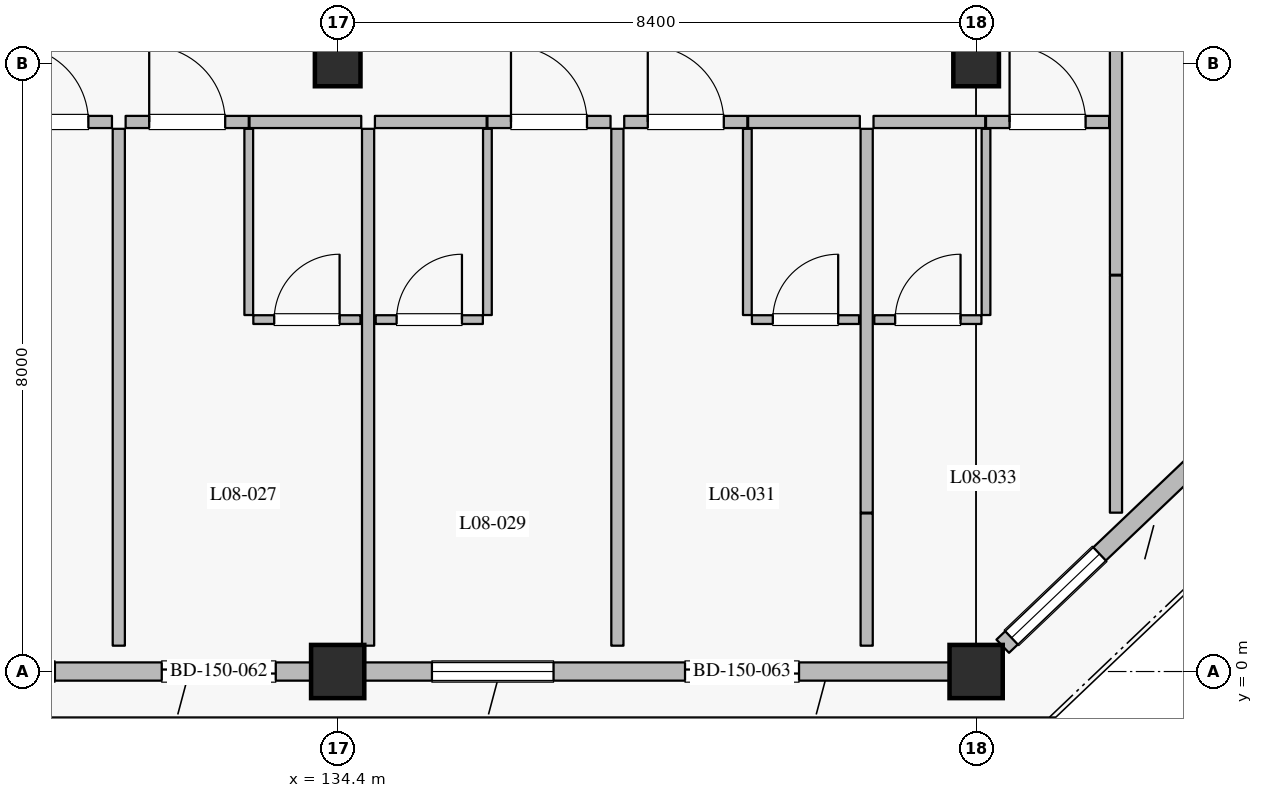
"""IFC4 building model, lengths in metres.
Left out: names, types, materials, properties, quantities, classifications, styles, units other than length and angle.
Written with IfcOpenShell. Run it as: python <this file> out.ifc"""

import sys

from ifc_helpers import new_model, si_unit, direction, frame, frame_2d, origin, origin_2d, place, context, subcontext, project, spatial, rectangle, extrude, element, fill, save


model = new_model("IFC4")
c1 = context("Model", 3, precision=1e-05, world=origin(), true_north=direction((0.0, 1.0)))
c2 = subcontext(c1, "Body", "Model", "MODEL_VIEW")
j1 = project(units=[si_unit("LENGTHUNIT", "METRE"), si_unit("PLANEANGLEUNIT", "RADIAN")], contexts=[c1])
p1 = place(None, origin())
s1 = spatial("IfcSite", under=j1, at=p1, CompositionType="ELEMENT")
p2 = place(p1, origin())
s2 = spatial("IfcBuilding", under=s1, at=p2, CompositionType="ELEMENT")
p3 = place(p2, frame((0.0, 0.0, 36.0)))
s3 = spatial("IfcBuildingStorey", under=s2, at=p3, CompositionType="ELEMENT", Elevation=36.0)
for number, where, z_axis, x_axis in (
    (1, (134.4, 0.0, 0.0), (0.0, 0.0, 1.0), (1.0, 0.0, 0.0)),
    (2, (142.8, 0.0, 0.0), (0.0, 0.0, 1.0), (1.0, 0.0, 0.0)),
):
    element("IfcColumn", number, at=place(p3, frame(where, z_axis=z_axis, x_axis=x_axis)), inside=s3, PredefinedType="COLUMN", context=c2, shape_type="SweptSolid", body=[
        extrude(rectangle(XDim=0.7, YDim=0.7, at=origin_2d()), origin(), (0.0, 0.0, 1.0), 3.6),
    ])
for number, where, z_axis, x_axis in (
    (3, (134.4, 8.0, 0.0), (0.0, 0.0, 1.0), (1.0, 0.0, 0.0)),
    (4, (142.8, 8.0, 0.0), (0.0, 0.0, 1.0), (1.0, 0.0, 0.0)),
):
    element("IfcColumn", number, at=place(p3, frame(where, z_axis=z_axis, x_axis=x_axis)), inside=s3, PredefinedType="COLUMN", context=c2, shape_type="SweptSolid", body=[
        extrude(rectangle(XDim=0.6, YDim=0.6, at=origin_2d()), origin(), (0.0, 0.0, 1.0), 3.6),
    ])
p4 = place(p3, frame((134.05, 0.0, 0.0), z_axis=(0.0, 0.0, 1.0), x_axis=(-1.0, 0.0, 0.0)))
e5 = element("IfcWall", 5, at=p4, inside=s3, PredefinedType="SOLIDWALL", context=c2, shape_type="SweptSolid", body=[
    extrude(rectangle(XDim=7.7, YDim=0.24, at=frame_2d((3.85, 0.0))), origin(), (0.0, 0.0, 1.0), 2.94),
])
p5 = place(p4, frame((0.465, 0.0, 0.0)))
e6 = element("IfcOpeningElement", 6, at=p5, cuts=e5, PredefinedType="OPENING", context=c2, shape_type="SweptSolid", body=[
    extrude(rectangle(XDim=1.5, YDim=2.25, at=frame_2d((0.75, 1.125))), frame((0.0, 0.13, 0.0), z_axis=(0.0, -1.0, 0.0), x_axis=(1.0, 0.0, 0.0)), (0.0, 0.0, 1.0), 0.26),
])
p6 = place(p4, frame((3.37, 0.0, 0.8)))
e7 = element("IfcOpeningElement", 7, at=p6, cuts=e5, PredefinedType="OPENING", context=c2, shape_type="SweptSolid", body=[
    extrude(rectangle(XDim=1.6, YDim=1.6, at=frame_2d((0.8, 0.8))), frame((0.0, 0.13, 0.0), z_axis=(0.0, -1.0, 0.0), x_axis=(1.0, 0.0, 0.0)), (0.0, 0.0, 1.0), 0.26),
])
p7 = place(p4, frame((6.105, 0.0, 0.8)))
e8 = element("IfcOpeningElement", 8, at=p7, cuts=e5, PredefinedType="OPENING", context=c2, shape_type="SweptSolid", body=[
    extrude(rectangle(XDim=1.4, YDim=1.6, at=frame_2d((0.7, 0.8))), frame((0.0, 0.13, 0.0), z_axis=(0.0, -1.0, 0.0), x_axis=(1.0, 0.0, 0.0)), (0.0, 0.0, 1.0), 0.26),
])
p8 = place(p3, frame((142.45, 0.0, 0.0), z_axis=(0.0, 0.0, 1.0), x_axis=(-1.0, 0.0, 0.0)))
e9 = element("IfcWall", 9, at=p8, inside=s3, PredefinedType="SOLIDWALL", context=c2, shape_type="SweptSolid", body=[
    extrude(rectangle(XDim=7.7, YDim=0.24, at=frame_2d((3.85, 0.0))), origin(), (0.0, 0.0, 1.0), 2.94),
])
p9 = place(p8, frame((1.98, 0.0, 0.0)))
e10 = element("IfcOpeningElement", 10, at=p9, cuts=e9, PredefinedType="OPENING", context=c2, shape_type="SweptSolid", body=[
    extrude(rectangle(XDim=1.5, YDim=2.25, at=frame_2d((0.75, 1.125))), frame((0.0, 0.13, 0.0), z_axis=(0.0, -1.0, 0.0), x_axis=(1.0, 0.0, 0.0)), (0.0, 0.0, 1.0), 0.26),
])
p10 = place(p8, frame((5.21, 0.0, 0.8)))
e11 = element("IfcOpeningElement", 11, at=p10, cuts=e9, PredefinedType="OPENING", context=c2, shape_type="SweptSolid", body=[
    extrude(rectangle(XDim=1.6, YDim=1.6, at=frame_2d((0.8, 0.8))), frame((0.0, 0.13, 0.0), z_axis=(0.0, -1.0, 0.0), x_axis=(1.0, 0.0, 0.0)), (0.0, 0.0, 1.0), 0.26),
])
p11 = place(p3, frame((150.85, 7.667, 0.0), z_axis=(0.0, 0.0, 1.0), x_axis=(-0.724116091282, -0.689678103427, 0.0)))
e12 = element("IfcWall", 12, at=p11, inside=s3, PredefinedType="SOLIDWALL", context=c2, shape_type="SweptSolid", body=[
    extrude(rectangle(XDim=10.634, YDim=0.24, at=frame_2d((5.317, 0.0))), origin(), (0.0, 0.0, 1.0), 2.94),
])
p12 = place(p11, frame((1.204, 0.0, 0.0)))
e13 = element("IfcOpeningElement", 13, at=p12, cuts=e12, PredefinedType="OPENING", context=c2, shape_type="SweptSolid", body=[
    extrude(rectangle(XDim=1.5, YDim=2.25, at=frame_2d((0.75, 1.125))), frame((0.0, 0.13, 0.0), z_axis=(0.0, -1.0, 0.0), x_axis=(1.0, 0.0, 0.0)), (0.0, 0.0, 1.0), 0.26),
])
p13 = place(p11, frame((5.511, 0.0, 0.8)))
e14 = element("IfcOpeningElement", 14, at=p13, cuts=e12, PredefinedType="OPENING", context=c2, shape_type="SweptSolid", body=[
    extrude(rectangle(XDim=1.6, YDim=1.6, at=frame_2d((0.8, 0.8))), frame((0.0, 0.13, 0.0), z_axis=(0.0, -1.0, 0.0), x_axis=(1.0, 0.0, 0.0)), (0.0, 0.0, 1.0), 0.26),
])
p14 = place(p11, frame((8.874, 0.0, 0.8)))
e15 = element("IfcOpeningElement", 15, at=p14, cuts=e12, PredefinedType="OPENING", context=c2, shape_type="SweptSolid", body=[
    extrude(rectangle(XDim=1.6, YDim=1.6, at=frame_2d((0.8, 0.8))), frame((0.0, 0.13, 0.0), z_axis=(0.0, -1.0, 0.0), x_axis=(1.0, 0.0, 0.0)), (0.0, 0.0, 1.0), 0.26),
])
p15 = place(p3, frame((129.81, 7.23, 0.0), z_axis=(0.0, 0.0, 1.0), x_axis=(1.0, 0.0, 0.0)))
e16 = element("IfcWall", 16, at=p15, inside=s3, PredefinedType="PARTITIONING", context=c2, shape_type="SweptSolid", body=[
    extrude(rectangle(XDim=1.62, YDim=0.16, at=frame_2d((0.81, 0.0))), origin(), (0.0, 0.0, 1.0), 3.365),
])
p16 = place(p15, frame((0.31, 0.0, 0.0)))
e17 = element("IfcOpeningElement", 17, at=p16, cuts=e16, PredefinedType="OPENING", context=c2, shape_type="SweptSolid", body=[
    extrude(rectangle(XDim=1.0, YDim=2.25, at=frame_2d((0.5, 1.125))), frame((0.0, 0.09, 0.0), z_axis=(0.0, -1.0, 0.0), x_axis=(1.0, 0.0, 0.0)), (0.0, 0.0, 1.0), 0.18),
])
p17 = place(p3, frame((131.61, 7.23, 0.0), z_axis=(0.0, 0.0, 1.0), x_axis=(1.0, 0.0, 0.0)))
e18 = element("IfcWall", 18, at=p17, inside=s3, PredefinedType="PARTITIONING", context=c2, shape_type="SweptSolid", body=[
    extrude(rectangle(XDim=1.62, YDim=0.16, at=frame_2d((0.81, 0.0))), origin(), (0.0, 0.0, 1.0), 3.365),
])
p18 = place(p17, frame((0.31, 0.0, 0.0)))
e19 = element("IfcOpeningElement", 19, at=p18, cuts=e18, PredefinedType="OPENING", context=c2, shape_type="SweptSolid", body=[
    extrude(rectangle(XDim=1.0, YDim=2.25, at=frame_2d((0.5, 1.125))), frame((0.0, 0.09, 0.0), z_axis=(0.0, -1.0, 0.0), x_axis=(1.0, 0.0, 0.0)), (0.0, 0.0, 1.0), 0.18),
])
p19 = place(p3, frame((133.24, 7.23, 0.0), z_axis=(0.0, 0.0, 1.0), x_axis=(1.0, 0.0, 0.0)))
e20 = element("IfcWall", 20, at=p19, inside=s3, PredefinedType="PARTITIONING", context=c2, shape_type="SweptSolid", body=[
    extrude(rectangle(XDim=1.47, YDim=0.16, at=frame_2d((0.735, 0.0))), origin(), (0.0, 0.0, 1.0), 3.365),
])
p20 = place(p3, frame((133.23, 4.69, 0.0), z_axis=(0.0, 0.0, 1.0), x_axis=(0.0, 1.0, 0.0)))
e21 = element("IfcWall", 21, at=p20, inside=s3, PredefinedType="PARTITIONING", context=c2, shape_type="SweptSolid", body=[
    extrude(rectangle(XDim=2.45, YDim=0.115, at=frame_2d((1.225, 0.0))), origin(), (0.0, 0.0, 1.0), 3.365),
])
p21 = place(p3, frame((133.29, 4.63, 0.0), z_axis=(0.0, 0.0, 1.0), x_axis=(1.0, 0.0, 0.0)))
e22 = element("IfcWall", 22, at=p21, inside=s3, PredefinedType="PARTITIONING", context=c2, shape_type="SweptSolid", body=[
    extrude(rectangle(XDim=1.41, YDim=0.115, at=frame_2d((0.705, 0.0))), origin(), (0.0, 0.0, 1.0), 3.365),
])
p22 = place(p21, frame((0.275, 0.0, 0.0)))
e23 = element("IfcOpeningElement", 23, at=p22, cuts=e22, PredefinedType="OPENING", context=c2, shape_type="SweptSolid", body=[
    extrude(rectangle(XDim=0.86, YDim=2.12, at=frame_2d((0.43, 1.06))), frame((0.0, 0.067, 0.0), z_axis=(0.0, -1.0, 0.0), x_axis=(1.0, 0.0, 0.0)), (0.0, 0.0, 1.0), 0.135),
])
p23 = place(p3, frame((131.52, 0.34, 0.0), z_axis=(0.0, 0.0, 1.0), x_axis=(0.0, 1.0, 0.0)))
e24 = element("IfcWall", 24, at=p23, inside=s3, PredefinedType="PARTITIONING", context=c2, shape_type="SweptSolid", body=[
    extrude(rectangle(XDim=6.8, YDim=0.16, at=frame_2d((3.4, 0.0))), origin(), (0.0, 0.0, 1.0), 3.365),
])
p24 = place(p3, frame((134.89, 7.23, 0.0), z_axis=(0.0, 0.0, 1.0), x_axis=(1.0, 0.0, 0.0)))
e25 = element("IfcWall", 25, at=p24, inside=s3, PredefinedType="PARTITIONING", context=c2, shape_type="SweptSolid", body=[
    extrude(rectangle(XDim=1.47, YDim=0.16, at=frame_2d((0.735, 0.0))), origin(), (0.0, 0.0, 1.0), 3.365),
])
p25 = place(p3, frame((136.37, 7.23, 0.0), z_axis=(0.0, 0.0, 1.0), x_axis=(1.0, 0.0, 0.0)))
e26 = element("IfcWall", 26, at=p25, inside=s3, PredefinedType="PARTITIONING", context=c2, shape_type="SweptSolid", body=[
    extrude(rectangle(XDim=1.62, YDim=0.16, at=frame_2d((0.81, 0.0))), origin(), (0.0, 0.0, 1.0), 3.365),
])
p26 = place(p25, frame((0.31, 0.0, 0.0)))
e27 = element("IfcOpeningElement", 27, at=p26, cuts=e26, PredefinedType="OPENING", context=c2, shape_type="SweptSolid", body=[
    extrude(rectangle(XDim=1.0, YDim=2.25, at=frame_2d((0.5, 1.125))), frame((0.0, 0.09, 0.0), z_axis=(0.0, -1.0, 0.0), x_axis=(1.0, 0.0, 0.0)), (0.0, 0.0, 1.0), 0.18),
])
p27 = place(p3, frame((136.37, 4.69, 0.0), z_axis=(0.0, 0.0, 1.0), x_axis=(0.0, 1.0, 0.0)))
e28 = element("IfcWall", 28, at=p27, inside=s3, PredefinedType="PARTITIONING", context=c2, shape_type="SweptSolid", body=[
    extrude(rectangle(XDim=2.45, YDim=0.115, at=frame_2d((1.225, 0.0))), origin(), (0.0, 0.0, 1.0), 3.365),
])
p28 = place(p3, frame((134.9, 4.63, 0.0), z_axis=(0.0, 0.0, 1.0), x_axis=(1.0, 0.0, 0.0)))
e29 = element("IfcWall", 29, at=p28, inside=s3, PredefinedType="PARTITIONING", context=c2, shape_type="SweptSolid", body=[
    extrude(rectangle(XDim=1.41, YDim=0.115, at=frame_2d((0.705, 0.0))), origin(), (0.0, 0.0, 1.0), 3.365),
])
p29 = place(p28, frame((0.275, 0.0, 0.0)))
e30 = element("IfcOpeningElement", 30, at=p29, cuts=e29, PredefinedType="OPENING", context=c2, shape_type="SweptSolid", body=[
    extrude(rectangle(XDim=0.86, YDim=2.12, at=frame_2d((0.43, 1.06))), frame((0.0, 0.067, 0.0), z_axis=(0.0, -1.0, 0.0), x_axis=(1.0, 0.0, 0.0)), (0.0, 0.0, 1.0), 0.135),
])
p30 = place(p3, frame((134.8, 0.34, 0.0), z_axis=(0.0, 0.0, 1.0), x_axis=(0.0, 1.0, 0.0)))
e31 = element("IfcWall", 31, at=p30, inside=s3, PredefinedType="PARTITIONING", context=c2, shape_type="SweptSolid", body=[
    extrude(rectangle(XDim=6.8, YDim=0.16, at=frame_2d((3.4, 0.0))), origin(), (0.0, 0.0, 1.0), 3.365),
])
p31 = place(p3, frame((138.17, 7.23, 0.0), z_axis=(0.0, 0.0, 1.0), x_axis=(1.0, 0.0, 0.0)))
e32 = element("IfcWall", 32, at=p31, inside=s3, PredefinedType="PARTITIONING", context=c2, shape_type="SweptSolid", body=[
    extrude(rectangle(XDim=1.62, YDim=0.16, at=frame_2d((0.81, 0.0))), origin(), (0.0, 0.0, 1.0), 3.365),
])
p32 = place(p31, frame((0.31, 0.0, 0.0)))
e33 = element("IfcOpeningElement", 33, at=p32, cuts=e32, PredefinedType="OPENING", context=c2, shape_type="SweptSolid", body=[
    extrude(rectangle(XDim=1.0, YDim=2.25, at=frame_2d((0.5, 1.125))), frame((0.0, 0.09, 0.0), z_axis=(0.0, -1.0, 0.0), x_axis=(1.0, 0.0, 0.0)), (0.0, 0.0, 1.0), 0.18),
])
p33 = place(p3, frame((139.8, 7.23, 0.0), z_axis=(0.0, 0.0, 1.0), x_axis=(1.0, 0.0, 0.0)))
e34 = element("IfcWall", 34, at=p33, inside=s3, PredefinedType="PARTITIONING", context=c2, shape_type="SweptSolid", body=[
    extrude(rectangle(XDim=1.47, YDim=0.16, at=frame_2d((0.735, 0.0))), origin(), (0.0, 0.0, 1.0), 3.365),
])
p34 = place(p3, frame((139.79, 4.69, 0.0), z_axis=(0.0, 0.0, 1.0), x_axis=(0.0, 1.0, 0.0)))
e35 = element("IfcWall", 35, at=p34, inside=s3, PredefinedType="PARTITIONING", context=c2, shape_type="SweptSolid", body=[
    extrude(rectangle(XDim=2.45, YDim=0.115, at=frame_2d((1.225, 0.0))), origin(), (0.0, 0.0, 1.0), 3.365),
])
p35 = place(p3, frame((139.85, 4.63, 0.0), z_axis=(0.0, 0.0, 1.0), x_axis=(1.0, 0.0, 0.0)))
e36 = element("IfcWall", 36, at=p35, inside=s3, PredefinedType="PARTITIONING", context=c2, shape_type="SweptSolid", body=[
    extrude(rectangle(XDim=1.41, YDim=0.115, at=frame_2d((0.705, 0.0))), origin(), (0.0, 0.0, 1.0), 3.365),
])
p36 = place(p35, frame((0.275, 0.0, 0.0)))
e37 = element("IfcOpeningElement", 37, at=p36, cuts=e36, PredefinedType="OPENING", context=c2, shape_type="SweptSolid", body=[
    extrude(rectangle(XDim=0.86, YDim=2.12, at=frame_2d((0.43, 1.06))), frame((0.0, 0.067, 0.0), z_axis=(0.0, -1.0, 0.0), x_axis=(1.0, 0.0, 0.0)), (0.0, 0.0, 1.0), 0.135),
])
p37 = place(p3, frame((138.08, 0.34, 0.0), z_axis=(0.0, 0.0, 1.0), x_axis=(0.0, 1.0, 0.0)))
e38 = element("IfcWall", 38, at=p37, inside=s3, PredefinedType="PARTITIONING", context=c2, shape_type="SweptSolid", body=[
    extrude(rectangle(XDim=6.8, YDim=0.16, at=frame_2d((3.4, 0.0))), origin(), (0.0, 0.0, 1.0), 3.365),
])
p38 = place(p3, frame((141.36, 0.34, 0.0), z_axis=(0.0, 0.0, 1.0), x_axis=(0.0, 1.0, 0.0)))
e39 = element("IfcWall", 39, at=p38, inside=s3, PredefinedType="PARTITIONING", context=c2, shape_type="SweptSolid", body=[
    extrude(rectangle(XDim=1.74, YDim=0.16, at=frame_2d((0.87, 0.0))), origin(), (0.0, 0.0, 1.0), 3.365),
])
p39 = place(p3, frame((141.45, 7.23, 0.0), z_axis=(0.0, 0.0, 1.0), x_axis=(1.0, 0.0, 0.0)))
e40 = element("IfcWall", 40, at=p39, inside=s3, PredefinedType="PARTITIONING", context=c2, shape_type="SweptSolid", body=[
    extrude(rectangle(XDim=1.47, YDim=0.16, at=frame_2d((0.735, 0.0))), origin(), (0.0, 0.0, 1.0), 3.365),
])
p40 = place(p3, frame((142.93, 7.23, 0.0), z_axis=(0.0, 0.0, 1.0), x_axis=(1.0, 0.0, 0.0)))
e41 = element("IfcWall", 41, at=p40, inside=s3, PredefinedType="PARTITIONING", context=c2, shape_type="SweptSolid", body=[
    extrude(rectangle(XDim=1.62, YDim=0.16, at=frame_2d((0.81, 0.0))), origin(), (0.0, 0.0, 1.0), 3.365),
])
p41 = place(p40, frame((0.31, 0.0, 0.0)))
e42 = element("IfcOpeningElement", 42, at=p41, cuts=e41, PredefinedType="OPENING", context=c2, shape_type="SweptSolid", body=[
    extrude(rectangle(XDim=1.0, YDim=2.25, at=frame_2d((0.5, 1.125))), frame((0.0, 0.09, 0.0), z_axis=(0.0, -1.0, 0.0), x_axis=(1.0, 0.0, 0.0)), (0.0, 0.0, 1.0), 0.18),
])
p42 = place(p3, frame((142.93, 4.69, 0.0), z_axis=(0.0, 0.0, 1.0), x_axis=(0.0, 1.0, 0.0)))
e43 = element("IfcWall", 43, at=p42, inside=s3, PredefinedType="PARTITIONING", context=c2, shape_type="SweptSolid", body=[
    extrude(rectangle(XDim=2.45, YDim=0.115, at=frame_2d((1.225, 0.0))), origin(), (0.0, 0.0, 1.0), 2.74),
])
p43 = place(p3, frame((141.46, 4.63, 0.0), z_axis=(0.0, 0.0, 1.0), x_axis=(1.0, 0.0, 0.0)))
e44 = element("IfcWall", 44, at=p43, inside=s3, PredefinedType="PARTITIONING", context=c2, shape_type="SweptSolid", body=[
    extrude(rectangle(XDim=1.41, YDim=0.115, at=frame_2d((0.705, 0.0))), origin(), (0.0, 0.0, 1.0), 3.365),
])
p44 = place(p43, frame((0.275, 0.0, 0.0)))
e45 = element("IfcOpeningElement", 45, at=p44, cuts=e44, PredefinedType="OPENING", context=c2, shape_type="SweptSolid", body=[
    extrude(rectangle(XDim=0.86, YDim=2.12, at=frame_2d((0.43, 1.06))), frame((0.0, 0.067, 0.0), z_axis=(0.0, -1.0, 0.0), x_axis=(1.0, 0.0, 0.0)), (0.0, 0.0, 1.0), 0.135),
])
p45 = place(p3, frame((141.36, 2.09, 0.0), z_axis=(0.0, 0.0, 1.0), x_axis=(0.0, 1.0, 0.0)))
e46 = element("IfcWall", 46, at=p45, inside=s3, PredefinedType="PARTITIONING", context=c2, shape_type="SweptSolid", body=[
    extrude(rectangle(XDim=5.05, YDim=0.16, at=frame_2d((2.525, 0.0))), origin(), (0.0, 0.0, 1.0), 3.365),
])
p46 = place(p3, frame((144.64, 2.09, 0.0), z_axis=(0.0, 0.0, 1.0), x_axis=(0.0, 1.0, 0.0)))
e47 = element("IfcWall", 47, at=p46, inside=s3, PredefinedType="PARTITIONING", context=c2, shape_type="SweptSolid", body=[
    extrude(rectangle(XDim=3.12, YDim=0.16, at=frame_2d((1.56, 0.0))), origin(), (0.0, 0.0, 1.0), 3.365),
])
p47 = place(p3, frame((144.64, 5.22, 0.0), z_axis=(0.0, 0.0, 1.0), x_axis=(0.0, 1.0, 0.0)))
e48 = element("IfcWall", 48, at=p47, inside=s3, PredefinedType="PARTITIONING", context=c2, shape_type="SweptSolid", body=[
    extrude(rectangle(XDim=9.32, YDim=0.16, at=frame_2d((4.66, 0.0))), origin(), (0.0, 0.0, 1.0), 3.365),
])
p48 = place(p5, origin())
e49 = element("IfcDoor", 49, at=p48, inside=s3, OperationType="SLIDING_TO_LEFT", PredefinedType="DOOR", context=c2, shape_type="SweptSolid", body=[
    extrude(rectangle(XDim=1.5, YDim=2.25, at=frame_2d((0.75, 1.125))), frame((0.0, 0.025, 0.0), z_axis=(0.0, -1.0, 0.0), x_axis=(1.0, 0.0, 0.0)), (0.0, 0.0, 1.0), 0.05),
])
fill(e6, e49)
p49 = place(p6, origin())
e50 = element("IfcWindow", 50, at=p49, inside=s3, PartitioningType="SINGLE_PANEL", PredefinedType="WINDOW", context=c2, shape_type="SweptSolid", body=[
    extrude(rectangle(XDim=1.6, YDim=1.6, at=frame_2d((0.8, 0.8))), frame((0.0, 0.03, 0.0), z_axis=(0.0, -1.0, 0.0), x_axis=(1.0, 0.0, 0.0)), (0.0, 0.0, 1.0), 0.06),
])
fill(e7, e50)
p50 = place(p9, origin())
e51 = element("IfcDoor", 51, at=p50, inside=s3, OperationType="SLIDING_TO_LEFT", PredefinedType="DOOR", context=c2, shape_type="SweptSolid", body=[
    extrude(rectangle(XDim=1.5, YDim=2.25, at=frame_2d((0.75, 1.125))), frame((0.0, 0.025, 0.0), z_axis=(0.0, -1.0, 0.0), x_axis=(1.0, 0.0, 0.0)), (0.0, 0.0, 1.0), 0.05),
])
fill(e10, e51)
p51 = place(p10, origin())
e52 = element("IfcWindow", 52, at=p51, inside=s3, PartitioningType="SINGLE_PANEL", PredefinedType="WINDOW", context=c2, shape_type="SweptSolid", body=[
    extrude(rectangle(XDim=1.6, YDim=1.6, at=frame_2d((0.8, 0.8))), frame((0.0, 0.03, 0.0), z_axis=(0.0, -1.0, 0.0), x_axis=(1.0, 0.0, 0.0)), (0.0, 0.0, 1.0), 0.06),
])
fill(e11, e52)
p52 = place(p14, origin())
e53 = element("IfcWindow", 53, at=p52, inside=s3, PartitioningType="SINGLE_PANEL", PredefinedType="WINDOW", context=c2, shape_type="SweptSolid", body=[
    extrude(rectangle(XDim=1.6, YDim=1.6, at=frame_2d((0.8, 0.8))), frame((0.0, 0.03, 0.0), z_axis=(0.0, -1.0, 0.0), x_axis=(1.0, 0.0, 0.0)), (0.0, 0.0, 1.0), 0.06),
])
fill(e15, e53)
p53 = place(p16, origin())
e54 = element("IfcDoor", 54, at=p53, inside=s3, OperationType="SINGLE_SWING_LEFT", PredefinedType="DOOR", context=c2, shape_type="SweptSolid", body=[
    extrude(rectangle(XDim=1.0, YDim=2.25, at=frame_2d((0.5, 1.125))), frame((0.0, 0.025, 0.0), z_axis=(0.0, -1.0, 0.0), x_axis=(1.0, 0.0, 0.0)), (0.0, 0.0, 1.0), 0.05),
])
fill(e17, e54)
p54 = place(p18, origin())
e55 = element("IfcDoor", 55, at=p54, inside=s3, OperationType="SINGLE_SWING_LEFT", PredefinedType="DOOR", context=c2, shape_type="SweptSolid", body=[
    extrude(rectangle(XDim=1.0, YDim=2.25, at=frame_2d((0.5, 1.125))), frame((0.0, 0.025, 0.0), z_axis=(0.0, -1.0, 0.0), x_axis=(1.0, 0.0, 0.0)), (0.0, 0.0, 1.0), 0.05),
])
fill(e19, e55)
p55 = place(p22, origin())
e56 = element("IfcDoor", 56, at=p55, inside=s3, OperationType="SINGLE_SWING_RIGHT", PredefinedType="DOOR", context=c2, shape_type="SweptSolid", body=[
    extrude(rectangle(XDim=0.86, YDim=2.12, at=frame_2d((0.43, 1.06))), frame((0.0, 0.025, 0.0), z_axis=(0.0, -1.0, 0.0), x_axis=(1.0, 0.0, 0.0)), (0.0, 0.0, 1.0), 0.05),
])
fill(e23, e56)
p56 = place(p26, origin())
e57 = element("IfcDoor", 57, at=p56, inside=s3, OperationType="SINGLE_SWING_LEFT", PredefinedType="DOOR", context=c2, shape_type="SweptSolid", body=[
    extrude(rectangle(XDim=1.0, YDim=2.25, at=frame_2d((0.5, 1.125))), frame((0.0, 0.025, 0.0), z_axis=(0.0, -1.0, 0.0), x_axis=(1.0, 0.0, 0.0)), (0.0, 0.0, 1.0), 0.05),
])
fill(e27, e57)
p57 = place(p29, origin())
e58 = element("IfcDoor", 58, at=p57, inside=s3, OperationType="SINGLE_SWING_RIGHT", PredefinedType="DOOR", context=c2, shape_type="SweptSolid", body=[
    extrude(rectangle(XDim=0.86, YDim=2.12, at=frame_2d((0.43, 1.06))), frame((0.0, 0.025, 0.0), z_axis=(0.0, -1.0, 0.0), x_axis=(1.0, 0.0, 0.0)), (0.0, 0.0, 1.0), 0.05),
])
fill(e30, e58)
p58 = place(p32, origin())
e59 = element("IfcDoor", 59, at=p58, inside=s3, OperationType="SINGLE_SWING_LEFT", PredefinedType="DOOR", context=c2, shape_type="SweptSolid", body=[
    extrude(rectangle(XDim=1.0, YDim=2.25, at=frame_2d((0.5, 1.125))), frame((0.0, 0.025, 0.0), z_axis=(0.0, -1.0, 0.0), x_axis=(1.0, 0.0, 0.0)), (0.0, 0.0, 1.0), 0.05),
])
fill(e33, e59)
p59 = place(p36, origin())
e60 = element("IfcDoor", 60, at=p59, inside=s3, OperationType="SINGLE_SWING_RIGHT", PredefinedType="DOOR", context=c2, shape_type="SweptSolid", body=[
    extrude(rectangle(XDim=0.86, YDim=2.12, at=frame_2d((0.43, 1.06))), frame((0.0, 0.025, 0.0), z_axis=(0.0, -1.0, 0.0), x_axis=(1.0, 0.0, 0.0)), (0.0, 0.0, 1.0), 0.05),
])
fill(e37, e60)
p60 = place(p41, origin())
e61 = element("IfcDoor", 61, at=p60, inside=s3, OperationType="SINGLE_SWING_LEFT", PredefinedType="DOOR", context=c2, shape_type="SweptSolid", body=[
    extrude(rectangle(XDim=1.0, YDim=2.25, at=frame_2d((0.5, 1.125))), frame((0.0, 0.025, 0.0), z_axis=(0.0, -1.0, 0.0), x_axis=(1.0, 0.0, 0.0)), (0.0, 0.0, 1.0), 0.05),
])
fill(e42, e61)
p61 = place(p44, origin())
e62 = element("IfcDoor", 62, at=p61, inside=s3, OperationType="SINGLE_SWING_RIGHT", PredefinedType="DOOR", context=c2, shape_type="SweptSolid", body=[
    extrude(rectangle(XDim=0.86, YDim=2.12, at=frame_2d((0.43, 1.06))), frame((0.0, 0.025, 0.0), z_axis=(0.0, -1.0, 0.0), x_axis=(1.0, 0.0, 0.0)), (0.0, 0.0, 1.0), 0.05),
])
fill(e45, e62)
save(model, sys.argv[1])
